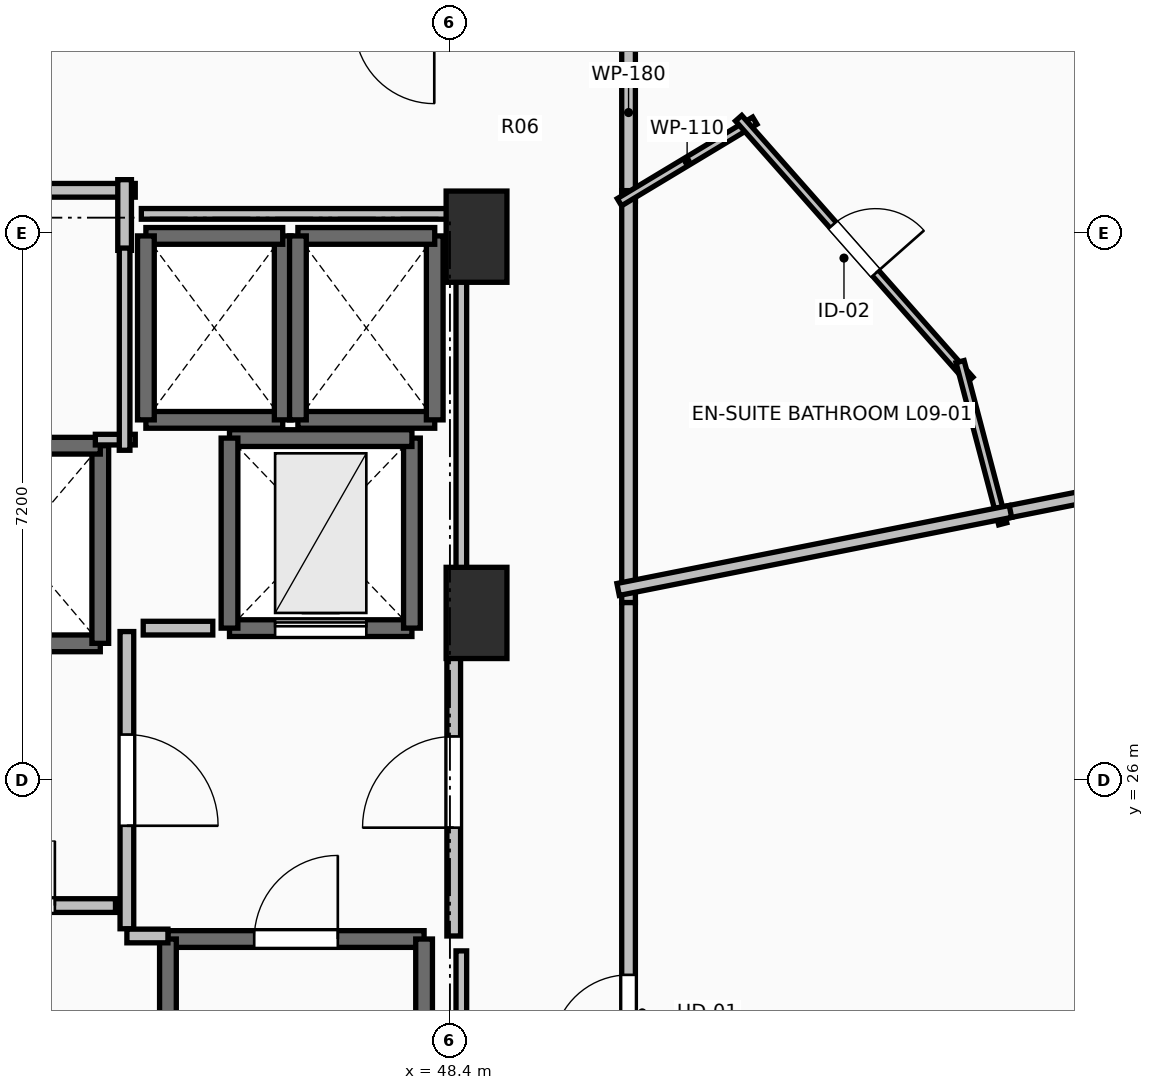
"""IFC4 building model, lengths in metres.
Left out: names, types, materials, properties, quantities, classifications, styles, units other than length and angle.
Written with IfcOpenShell. Run it as: python <this file> out.ifc"""

import sys

from ifc_helpers import new_model, si_unit, direction, frame, frame_2d, origin, origin_2d, place, context, subcontext, project, spatial, rectangle, extrude, element, fill, save


model = new_model("IFC4")
c1 = context("Model", 3, precision=1e-05, world=origin(), true_north=direction((0.0, 1.0)))
c2 = subcontext(c1, "Body", "Model", "MODEL_VIEW")
j1 = project(units=[si_unit("LENGTHUNIT", "METRE"), si_unit("PLANEANGLEUNIT", "RADIAN")], contexts=[c1])
p1 = place(None, origin())
s1 = spatial("IfcSite", under=j1, at=p1, CompositionType="ELEMENT")
p2 = place(p1, origin())
s2 = spatial("IfcBuilding", under=s1, at=p2, CompositionType="ELEMENT")
p3 = place(p2, frame((0.0, 0.0, 38.0)))
s3 = spatial("IfcBuildingStorey", under=s2, at=p3, CompositionType="ELEMENT", Elevation=38.0)
for number, where, z_axis, x_axis in (
    (1, (48.75, 33.15, 0.0), (0.0, 0.0, 1.0), (1.0, 0.0, 0.0)),
    (2, (48.75, 28.2, 0.0), (0.0, 0.0, 1.0), (1.0, 0.0, 0.0)),
):
    element("IfcColumn", number, at=place(p3, frame(where, z_axis=z_axis, x_axis=x_axis)), inside=s3, PredefinedType="PILASTER", context=c2, shape_type="SweptSolid", body=[
        extrude(rectangle(XDim=0.8, YDim=1.2, at=origin_2d()), origin(), (0.0, 0.0, 1.0), 3.5),
    ])
p4 = place(p3, frame((44.69, 23.91, 0.0), z_axis=(0.0, 0.0, 1.0), x_axis=(1.0, 0.0, 0.0)))
e3 = element("IfcWall", 3, at=p4, inside=s3, PredefinedType="SOLIDWALL", context=c2, shape_type="SweptSolid", body=[
    extrude(rectangle(XDim=3.37, YDim=0.22, at=frame_2d((1.685, 0.0))), origin(), (0.0, 0.0, 1.0), 3.24),
])
p5 = place(p4, frame((1.135, 0.0, 0.0)))
e4 = element("IfcOpeningElement", 4, at=p5, cuts=e3, PredefinedType="OPENING", context=c2, shape_type="SweptSolid", body=[
    extrude(rectangle(XDim=1.1, YDim=2.15, at=frame_2d((0.55, 1.075))), frame((0.0, 0.125, 0.0), z_axis=(0.0, -1.0, 0.0), x_axis=(1.0, 0.0, 0.0)), (0.0, 0.0, 1.0), 0.25),
])
for number, where, z_axis, x_axis in (
    (5, (48.06, 23.91, 0.0), (0.0, 0.0, 1.0), (0.0, -1.0, 0.0)),
    (6, (44.69, 16.49, 0.0), (0.0, 0.0, 1.0), (0.0, 1.0, 0.0)),
):
    element("IfcWall", number, at=place(p3, frame(where, z_axis=z_axis, x_axis=x_axis)), inside=s3, PredefinedType="SOLIDWALL", context=c2, shape_type="SweptSolid", body=[
        extrude(rectangle(XDim=7.42, YDim=0.22, at=frame_2d((3.71, 0.0))), origin(), (0.0, 0.0, 1.0), 3.24),
    ])
p6 = place(p3, frame((41.6, 27.8, 0.0), z_axis=(0.0, 0.0, 1.0), x_axis=(1.0, 0.0, 0.0)))
e7 = element("IfcWall", 7, at=p6, inside=s3, PredefinedType="SOLIDWALL", context=c2, shape_type="SweptSolid", body=[
    extrude(rectangle(XDim=2.2, YDim=0.22, at=frame_2d((1.1, 0.0))), origin(), (0.0, 0.0, 1.0), 3.24),
])
p7 = place(p3, frame((43.8, 27.8, 0.0), z_axis=(0.0, 0.0, 1.0), x_axis=(0.0, 1.0, 0.0)))
e8 = element("IfcWall", 8, at=p7, inside=s3, PredefinedType="SOLIDWALL", context=c2, shape_type="SweptSolid", body=[
    extrude(rectangle(XDim=2.6, YDim=0.22, at=frame_2d((1.3, 0.0))), origin(), (0.0, 0.0, 1.0), 3.24),
])
p8 = place(p3, frame((43.8, 30.4, 0.0), z_axis=(0.0, 0.0, 1.0), x_axis=(-1.0, 0.0, 0.0)))
e9 = element("IfcWall", 9, at=p8, inside=s3, PredefinedType="SOLIDWALL", context=c2, shape_type="SweptSolid", body=[
    extrude(rectangle(XDim=2.2, YDim=0.22, at=frame_2d((1.1, 0.0))), origin(), (0.0, 0.0, 1.0), 3.24),
])
p9 = place(p3, frame((44.4, 30.74, 0.0), z_axis=(0.0, 0.0, 1.0), x_axis=(1.0, 0.0, 0.0)))
e10 = element("IfcWall", 10, at=p9, inside=s3, PredefinedType="SOLIDWALL", context=c2, shape_type="SweptSolid", body=[
    extrude(rectangle(XDim=1.8, YDim=0.22, at=frame_2d((0.9, 0.0))), origin(), (0.0, 0.0, 1.0), 3.24),
])
p10 = place(p3, frame((46.2, 30.74, 0.0), z_axis=(0.0, 0.0, 1.0), x_axis=(0.0, 1.0, 0.0)))
e11 = element("IfcWall", 11, at=p10, inside=s3, PredefinedType="SOLIDWALL", context=c2, shape_type="SweptSolid", body=[
    extrude(rectangle(XDim=2.42, YDim=0.22, at=frame_2d((1.21, 0.0))), origin(), (0.0, 0.0, 1.0), 3.24),
])
p11 = place(p3, frame((46.2, 33.16, 0.0), z_axis=(0.0, 0.0, 1.0), x_axis=(-1.0, 0.0, 0.0)))
e12 = element("IfcWall", 12, at=p11, inside=s3, PredefinedType="SOLIDWALL", context=c2, shape_type="SweptSolid", body=[
    extrude(rectangle(XDim=1.8, YDim=0.22, at=frame_2d((0.9, 0.0))), origin(), (0.0, 0.0, 1.0), 3.24),
])
p12 = place(p3, frame((44.4, 33.16, 0.0), z_axis=(0.0, 0.0, 1.0), x_axis=(0.0, -1.0, 0.0)))
e13 = element("IfcWall", 13, at=p12, inside=s3, PredefinedType="SOLIDWALL", context=c2, shape_type="SweptSolid", body=[
    extrude(rectangle(XDim=2.42, YDim=0.22, at=frame_2d((1.21, 0.0))), origin(), (0.0, 0.0, 1.0), 3.24),
])
p13 = place(p3, frame((46.4, 30.74, 0.0), z_axis=(0.0, 0.0, 1.0), x_axis=(1.0, 0.0, 0.0)))
e14 = element("IfcWall", 14, at=p13, inside=s3, PredefinedType="SOLIDWALL", context=c2, shape_type="SweptSolid", body=[
    extrude(rectangle(XDim=1.8, YDim=0.22, at=frame_2d((0.9, 0.0))), origin(), (0.0, 0.0, 1.0), 3.24),
])
p14 = place(p3, frame((48.2, 30.74, 0.0), z_axis=(0.0, 0.0, 1.0), x_axis=(0.0, 1.0, 0.0)))
e15 = element("IfcWall", 15, at=p14, inside=s3, PredefinedType="SOLIDWALL", context=c2, shape_type="SweptSolid", body=[
    extrude(rectangle(XDim=2.42, YDim=0.22, at=frame_2d((1.21, 0.0))), origin(), (0.0, 0.0, 1.0), 3.24),
])
p15 = place(p3, frame((48.2, 33.16, 0.0), z_axis=(0.0, 0.0, 1.0), x_axis=(-1.0, 0.0, 0.0)))
e16 = element("IfcWall", 16, at=p15, inside=s3, PredefinedType="SOLIDWALL", context=c2, shape_type="SweptSolid", body=[
    extrude(rectangle(XDim=1.8, YDim=0.22, at=frame_2d((0.9, 0.0))), origin(), (0.0, 0.0, 1.0), 3.24),
])
p16 = place(p3, frame((46.4, 33.16, 0.0), z_axis=(0.0, 0.0, 1.0), x_axis=(0.0, -1.0, 0.0)))
e17 = element("IfcWall", 17, at=p16, inside=s3, PredefinedType="SOLIDWALL", context=c2, shape_type="SweptSolid", body=[
    extrude(rectangle(XDim=2.42, YDim=0.22, at=frame_2d((1.21, 0.0))), origin(), (0.0, 0.0, 1.0), 3.24),
])
p17 = place(p3, frame((45.5, 28.0, 0.0), z_axis=(0.0, 0.0, 1.0), x_axis=(1.0, 0.0, 0.0)))
e18 = element("IfcWall", 18, at=p17, inside=s3, PredefinedType="SHEAR", context=c2, shape_type="SweptSolid", body=[
    extrude(rectangle(XDim=2.4, YDim=0.22, at=frame_2d((1.2, 0.0))), origin(), (0.0, 0.0, 1.0), 3.24),
])
p18 = place(p17, frame((0.6, 0.0, 0.0)))
e19 = element("IfcOpeningElement", 19, at=p18, cuts=e18, PredefinedType="OPENING", context=c2, shape_type="SweptSolid", body=[
    extrude(rectangle(XDim=1.2, YDim=2.2, at=frame_2d((0.6, 1.1))), frame((0.0, 0.125, 0.0), z_axis=(0.0, -1.0, 0.0), x_axis=(1.0, 0.0, 0.0)), (0.0, 0.0, 1.0), 0.25),
])
p19 = place(p3, frame((47.9, 28.0, 0.0), z_axis=(0.0, 0.0, 1.0), x_axis=(0.0, 1.0, 0.0)))
e20 = element("IfcWall", 20, at=p19, inside=s3, PredefinedType="SHEAR", context=c2, shape_type="SweptSolid", body=[
    extrude(rectangle(XDim=2.5, YDim=0.22, at=frame_2d((1.25, 0.0))), origin(), (0.0, 0.0, 1.0), 3.24),
])
p20 = place(p3, frame((47.9, 30.5, 0.0), z_axis=(0.0, 0.0, 1.0), x_axis=(-1.0, 0.0, 0.0)))
e21 = element("IfcWall", 21, at=p20, inside=s3, PredefinedType="SHEAR", context=c2, shape_type="SweptSolid", body=[
    extrude(rectangle(XDim=2.4, YDim=0.22, at=frame_2d((1.2, 0.0))), origin(), (0.0, 0.0, 1.0), 3.24),
])
p21 = place(p3, frame((45.5, 30.5, 0.0), z_axis=(0.0, 0.0, 1.0), x_axis=(0.0, -1.0, 0.0)))
e22 = element("IfcWall", 22, at=p21, inside=s3, PredefinedType="SHEAR", context=c2, shape_type="SweptSolid", body=[
    extrude(rectangle(XDim=2.5, YDim=0.22, at=frame_2d((1.25, 0.0))), origin(), (0.0, 0.0, 1.0), 3.24),
])
p22 = place(p3, frame((44.15, 27.955, 0.0), z_axis=(0.0, 0.0, 1.0), x_axis=(0.0, -1.0, 0.0)))
e23 = element("IfcWall", 23, at=p22, inside=s3, PredefinedType="PARTITIONING", context=c2, shape_type="SweptSolid", body=[
    extrude(rectangle(XDim=3.91, YDim=0.18, at=frame_2d((1.955, 0.0))), origin(), (0.0, 0.0, 1.0), 3.24),
])
p23 = place(p22, frame((1.355, 0.0, 0.0)))
e24 = element("IfcOpeningElement", 24, at=p23, cuts=e23, PredefinedType="OPENING", context=c2, shape_type="SweptSolid", body=[
    extrude(rectangle(XDim=1.2, YDim=2.15, at=frame_2d((0.6, 1.075))), frame((0.0, 0.105, 0.0), z_axis=(0.0, -1.0, 0.0), x_axis=(1.0, 0.0, 0.0)), (0.0, 0.0, 1.0), 0.21),
])
p24 = place(p3, frame((44.15, 23.95, 0.0), z_axis=(0.0, 0.0, 1.0), x_axis=(1.0, 0.0, 0.0)))
e25 = element("IfcWall", 25, at=p24, inside=s3, PredefinedType="PARTITIONING", context=c2, shape_type="SweptSolid", body=[
    extrude(rectangle(XDim=0.54, YDim=0.18, at=frame_2d((0.27, 0.0))), origin(), (0.0, 0.0, 1.0), 3.24),
])
p25 = place(p3, frame((48.45, 23.95, 0.0), z_axis=(0.0, 0.0, 1.0), x_axis=(0.0, 1.0, 0.0)))
e26 = element("IfcWall", 26, at=p25, inside=s3, PredefinedType="PARTITIONING", context=c2, shape_type="SweptSolid", body=[
    extrude(rectangle(XDim=4.05, YDim=0.18, at=frame_2d((2.025, 0.0))), origin(), (0.0, 0.0, 1.0), 3.24),
])
p26 = place(p25, frame((1.425, 0.0, 0.0)))
e27 = element("IfcOpeningElement", 27, at=p26, cuts=e26, PredefinedType="OPENING", context=c2, shape_type="SweptSolid", body=[
    extrude(rectangle(XDim=1.2, YDim=2.15, at=frame_2d((0.6, 1.075))), frame((0.0, 0.105, 0.0), z_axis=(0.0, -1.0, 0.0), x_axis=(1.0, 0.0, 0.0)), (0.0, 0.0, 1.0), 0.21),
])
p27 = place(p3, frame((41.555, 24.35, 0.0), z_axis=(0.0, 0.0, 1.0), x_axis=(1.0, 0.0, 0.0)))
e28 = element("IfcWall", 28, at=p27, inside=s3, PredefinedType="PARTITIONING", context=c2, shape_type="SweptSolid", body=[
    extrude(rectangle(XDim=2.445, YDim=0.18, at=frame_2d((1.223, 0.0))), origin(), (0.0, 0.0, 1.0), 3.24),
])
p28 = place(p27, frame((0.798, 0.0, 0.0)))
e29 = element("IfcOpeningElement", 29, at=p28, cuts=e28, PredefinedType="OPENING", context=c2, shape_type="SweptSolid", body=[
    extrude(rectangle(XDim=0.85, YDim=2.1, at=frame_2d((0.425, 1.05))), frame((0.0, 0.105, 0.0), z_axis=(0.0, -1.0, 0.0), x_axis=(1.0, 0.0, 0.0)), (0.0, 0.0, 1.0), 0.21),
])
p29 = place(p3, frame((44.26, 33.76, 0.0), z_axis=(0.0, 0.0, 1.0), x_axis=(-1.0, 0.0, 0.0)))
e30 = element("IfcWall", 30, at=p29, inside=s3, PredefinedType="PARTITIONING", context=c2, shape_type="SweptSolid", body=[
    extrude(rectangle(XDim=6.91, YDim=0.18, at=frame_2d((3.455, 0.0))), origin(), (0.0, 0.0, 1.0), 3.24),
])
p30 = place(p29, frame((3.03, 0.0, 0.0)))
e31 = element("IfcOpeningElement", 31, at=p30, cuts=e30, PredefinedType="OPENING", context=c2, shape_type="SweptSolid", body=[
    extrude(rectangle(XDim=0.85, YDim=2.1, at=frame_2d((0.425, 1.05))), frame((0.0, 0.105, 0.0), z_axis=(0.0, -1.0, 0.0), x_axis=(1.0, 0.0, 0.0)), (0.0, 0.0, 1.0), 0.21),
])
p31 = place(p3, frame((44.12, 32.97, 0.0), z_axis=(0.0, 0.0, 1.0), x_axis=(0.0, 1.0, 0.0)))
e32 = element("IfcWall", 32, at=p31, inside=s3, PredefinedType="PARTITIONING", context=c2, shape_type="SweptSolid", body=[
    extrude(rectangle(XDim=0.93, YDim=0.18, at=frame_2d((0.465, 0.0))), origin(), (0.0, 0.0, 1.0), 3.24),
])
p32 = place(p3, frame((50.75, 33.616, 0.0), z_axis=(0.0, 0.0, 1.0), x_axis=(0.0, 1.0, 0.0)))
e33 = element("IfcWall", 33, at=p32, inside=s3, PredefinedType="PARTITIONING", context=c2, shape_type="SweptSolid", body=[
    extrude(rectangle(XDim=2.334, YDim=0.18, at=frame_2d((1.167, 0.0))), origin(), (0.0, 0.0, 1.0), 2.432),
])
p33 = place(p3, frame((50.75, 28.336, 0.0), z_axis=(0.0, 0.0, 1.0), x_axis=(0.0, 1.0, 0.0)))
e34 = element("IfcWall", 34, at=p33, inside=s3, PredefinedType="PARTITIONING", context=c2, shape_type="SweptSolid", body=[
    extrude(rectangle(XDim=5.42, YDim=0.18, at=frame_2d((2.71, 0.0))), origin(), (0.0, 0.0, 1.0), 2.432),
])
p34 = place(p3, frame((50.75, 17.541, 0.0), z_axis=(0.0, 0.0, 1.0), x_axis=(0.0, 1.0, 0.0)))
e35 = element("IfcWall", 35, at=p34, inside=s3, PredefinedType="PARTITIONING", context=c2, shape_type="SweptSolid", body=[
    extrude(rectangle(XDim=10.795, YDim=0.18, at=frame_2d((5.397, 0.0))), origin(), (0.0, 0.0, 1.0), 2.432),
])
p35 = place(p34, frame((4.897, 0.0, 0.0)))
e36 = element("IfcOpeningElement", 36, at=p35, cuts=e35, PredefinedType="OPENING", context=c2, shape_type="SweptSolid", body=[
    extrude(rectangle(XDim=1.0, YDim=2.15, at=frame_2d((0.5, 1.075))), frame((0.0, 0.105, 0.0), z_axis=(0.0, -1.0, 0.0), x_axis=(1.0, 0.0, 0.0)), (0.0, 0.0, 1.0), 0.21),
])
p36 = place(p3, frame((50.63, 33.604, 0.0), z_axis=(0.0, 0.0, 1.0), x_axis=(0.856631627837, 0.515928535932, 0.0)))
e37 = element("IfcWall", 37, at=p36, inside=s3, PredefinedType="PARTITIONING", context=c2, shape_type="SweptSolid", body=[
    extrude(rectangle(XDim=2.079, YDim=0.11, at=frame_2d((1.04, 0.0))), origin(), (0.0, 0.0, 1.0), 3.24),
])
p37 = place(p3, frame((52.198, 34.709, 0.0), z_axis=(0.0, 0.0, 1.0), x_axis=(0.662071486681, -0.74944068913, 0.0)))
e38 = element("IfcWall", 38, at=p37, inside=s3, PredefinedType="PARTITIONING", context=c2, shape_type="SweptSolid", body=[
    extrude(rectangle(XDim=4.594, YDim=0.11, at=frame_2d((2.297, 0.0))), origin(), (0.0, 0.0, 1.0), 2.432),
])
p38 = place(p37, frame((1.872, 0.0, 0.0)))
e39 = element("IfcOpeningElement", 39, at=p38, cuts=e38, PredefinedType="OPENING", context=c2, shape_type="SweptSolid", body=[
    extrude(rectangle(XDim=0.85, YDim=2.1, at=frame_2d((0.425, 1.05))), frame((0.0, 0.07, 0.0), z_axis=(0.0, -1.0, 0.0), x_axis=(1.0, 0.0, 0.0)), (0.0, 0.0, 1.0), 0.14),
])
p39 = place(p3, frame((55.111, 31.506, 0.0), z_axis=(0.0, 0.0, 1.0), x_axis=(0.254389812051, -0.967101764823, 0.0)))
e40 = element("IfcWall", 40, at=p39, inside=s3, PredefinedType="PARTITIONING", context=c2, shape_type="SweptSolid", body=[
    extrude(rectangle(XDim=2.206, YDim=0.11, at=frame_2d((1.103, 0.0))), origin(), (0.0, 0.0, 1.0), 3.24),
])
p40 = place(p3, frame((55.637, 29.508, 0.0), z_axis=(0.0, 0.0, 1.0), x_axis=(0.980781844691, 0.195107593712, 0.0)))
e41 = element("IfcWall", 41, at=p40, inside=s3, PredefinedType="PARTITIONING", context=c2, shape_type="SweptSolid", body=[
    extrude(rectangle(XDim=11.034, YDim=0.16, at=frame_2d((5.517, 0.0))), origin(), (0.0, 0.0, 1.0), 2.624),
])
p41 = place(p3, frame((50.613, 28.509, 0.0), z_axis=(0.0, 0.0, 1.0), x_axis=(0.980788877604, 0.195072236795, 0.0)))
e42 = element("IfcWall", 42, at=p41, inside=s3, PredefinedType="PARTITIONING", context=c2, shape_type="SweptSolid", body=[
    extrude(rectangle(XDim=5.263, YDim=0.16, at=frame_2d((2.631, 0.0))), origin(), (0.0, 0.0, 1.0), 2.972),
])
p42 = place(p3, frame((45.28, 28.0, 0.0), z_axis=(0.0, 0.0, 1.0), x_axis=(-1.0, 0.0, 0.0)))
e43 = element("IfcWall", 43, at=p42, inside=s3, PredefinedType="PARTITIONING", context=c2, shape_type="SweptSolid", body=[
    extrude(rectangle(XDim=0.915, YDim=0.18, at=frame_2d((0.458, 0.0))), origin(), (0.0, 0.0, 1.0), 3.24),
])
p43 = place(p3, frame((43.735, 30.48, 0.0), z_axis=(0.0, 0.0, 1.0), x_axis=(1.0, 0.0, 0.0)))
e44 = element("IfcWall", 44, at=p43, inside=s3, PredefinedType="PARTITIONING", context=c2, shape_type="SweptSolid", body=[
    extrude(rectangle(XDim=0.525, YDim=0.14, at=frame_2d((0.262, 0.0))), origin(), (0.0, 0.0, 1.0), 3.24),
])
p44 = place(p3, frame((44.12, 30.34, 0.0), z_axis=(0.0, 0.0, 1.0), x_axis=(0.0, 1.0, 0.0)))
e45 = element("IfcWall", 45, at=p44, inside=s3, PredefinedType="PARTITIONING", context=c2, shape_type="SweptSolid", body=[
    extrude(rectangle(XDim=2.66, YDim=0.14, at=frame_2d((1.33, 0.0))), origin(), (0.0, 0.0, 1.0), 3.24),
])
p45 = place(p3, frame((44.34, 33.45, 0.0), z_axis=(0.0, 0.0, 1.0), x_axis=(1.0, 0.0, 0.0)))
e46 = element("IfcWall", 46, at=p45, inside=s3, PredefinedType="PARTITIONING", context=c2, shape_type="SweptSolid", body=[
    extrude(rectangle(XDim=4.21, YDim=0.14, at=frame_2d((2.105, 0.0))), origin(), (0.0, 0.0, 1.0), 2.432),
])
p46 = place(p3, frame((48.55, 33.45, 0.0), z_axis=(0.0, 0.0, 1.0), x_axis=(0.0, -1.0, 0.0)))
e47 = element("IfcWall", 47, at=p46, inside=s3, PredefinedType="PARTITIONING", context=c2, shape_type="SweptSolid", body=[
    extrude(rectangle(XDim=5.254, YDim=0.14, at=frame_2d((2.627, 0.0))), origin(), (0.0, 0.0, 1.0), 2.432),
])
p47 = place(p3, frame((48.55, 23.754, 0.0), z_axis=(0.0, 0.0, 1.0), x_axis=(0.0, -1.0, 0.0)))
e48 = element("IfcWall", 48, at=p47, inside=s3, PredefinedType="PARTITIONING", context=c2, shape_type="SweptSolid", body=[
    extrude(rectangle(XDim=7.514, YDim=0.14, at=frame_2d((3.757, 0.0))), origin(), (0.0, 0.0, 1.0), 2.432),
])
p48 = place(p5, origin())
e49 = element("IfcDoor", 49, at=p48, inside=s3, OperationType="SINGLE_SWING_RIGHT", PredefinedType="DOOR", context=c2, shape_type="SweptSolid", body=[
    extrude(rectangle(XDim=1.1, YDim=2.15, at=frame_2d((0.55, 1.075))), frame((0.0, 0.025, 0.0), z_axis=(0.0, -1.0, 0.0), x_axis=(1.0, 0.0, 0.0)), (0.0, 0.0, 1.0), 0.05),
])
fill(e4, e49)
p49 = place(p18, origin())
e50 = element("IfcDoor", 50, at=p49, inside=s3, OperationType="SLIDING_TO_LEFT", PredefinedType="DOOR", context=c2, shape_type="SweptSolid", body=[
    extrude(rectangle(XDim=1.2, YDim=2.2, at=frame_2d((0.6, 1.1))), frame((0.0, 0.025, 0.0), z_axis=(0.0, -1.0, 0.0), x_axis=(1.0, 0.0, 0.0)), (0.0, 0.0, 1.0), 0.05),
])
fill(e19, e50)
p50 = place(p23, origin())
e51 = element("IfcDoor", 51, at=p50, inside=s3, OperationType="SINGLE_SWING_RIGHT", PredefinedType="DOOR", context=c2, shape_type="SweptSolid", body=[
    extrude(rectangle(XDim=1.2, YDim=2.15, at=frame_2d((0.6, 1.075))), frame((0.0, 0.025, 0.0), z_axis=(0.0, -1.0, 0.0), x_axis=(1.0, 0.0, 0.0)), (0.0, 0.0, 1.0), 0.05),
])
fill(e24, e51)
p51 = place(p26, origin())
e52 = element("IfcDoor", 52, at=p51, inside=s3, OperationType="SINGLE_SWING_LEFT", PredefinedType="DOOR", context=c2, shape_type="SweptSolid", body=[
    extrude(rectangle(XDim=1.2, YDim=2.15, at=frame_2d((0.6, 1.075))), frame((0.0, 0.025, 0.0), z_axis=(0.0, -1.0, 0.0), x_axis=(1.0, 0.0, 0.0)), (0.0, 0.0, 1.0), 0.05),
])
fill(e27, e52)
p52 = place(p28, origin())
e53 = element("IfcDoor", 53, at=p52, inside=s3, OperationType="SINGLE_SWING_RIGHT", PredefinedType="DOOR", context=c2, shape_type="SweptSolid", body=[
    extrude(rectangle(XDim=0.85, YDim=2.1, at=frame_2d((0.425, 1.05))), frame((0.0, 0.025, 0.0), z_axis=(0.0, -1.0, 0.0), x_axis=(1.0, 0.0, 0.0)), (0.0, 0.0, 1.0), 0.05),
])
fill(e29, e53)
p53 = place(p35, origin())
e54 = element("IfcDoor", 54, at=p53, inside=s3, OperationType="SINGLE_SWING_LEFT", PredefinedType="DOOR", context=c2, shape_type="SweptSolid", body=[
    extrude(rectangle(XDim=1.0, YDim=2.15, at=frame_2d((0.5, 1.075))), frame((0.0, 0.025, 0.0), z_axis=(0.0, -1.0, 0.0), x_axis=(1.0, 0.0, 0.0)), (0.0, 0.0, 1.0), 0.05),
])
fill(e36, e54)
p54 = place(p38, origin())
e55 = element("IfcDoor", 55, at=p54, inside=s3, OperationType="SINGLE_SWING_RIGHT", PredefinedType="DOOR", context=c2, shape_type="SweptSolid", body=[
    extrude(rectangle(XDim=0.85, YDim=2.1, at=frame_2d((0.425, 1.05))), frame((0.0, 0.025, 0.0), z_axis=(0.0, -1.0, 0.0), x_axis=(1.0, 0.0, 0.0)), (0.0, 0.0, 1.0), 0.05),
])
fill(e39, e55)
save(model, sys.argv[1])
